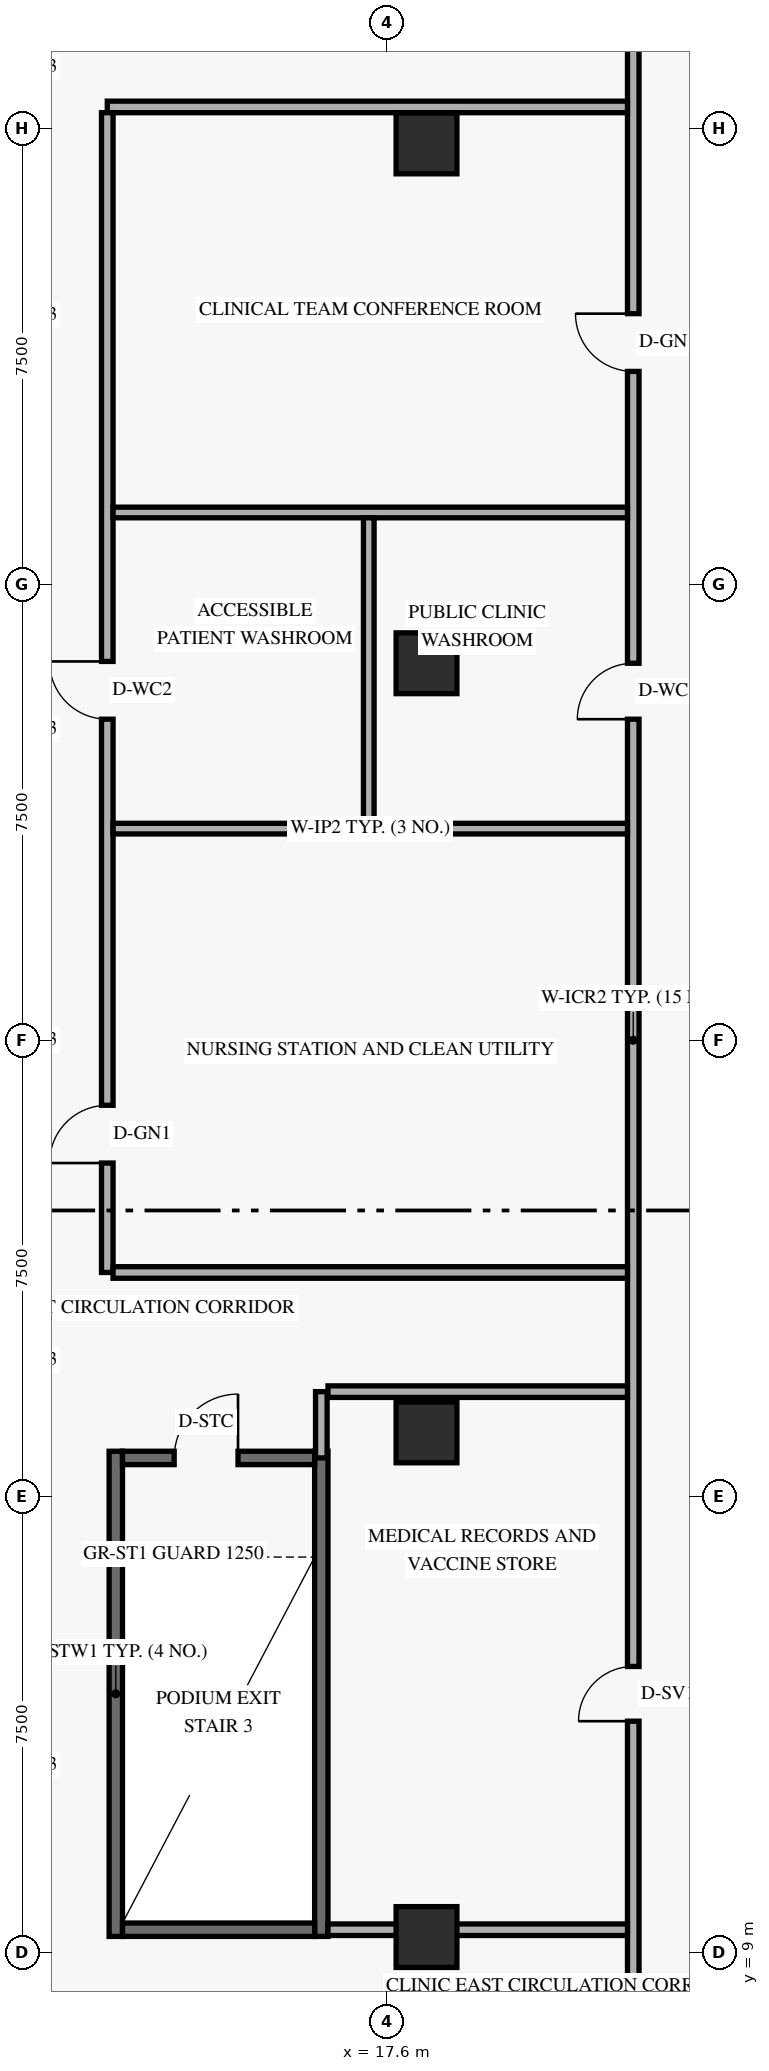
"""IFC4 building model, lengths in metres.
Left out: names, types, materials, properties, quantities, classifications, styles, units other than length and angle.
Written with IfcOpenShell. Run it as: python <this file> out.ifc"""

import sys

from ifc_helpers import new_model, si_unit, direction, frame, frame_2d, origin, origin_2d, place, context, subcontext, project, spatial, rectangle, extrude, element, fill, save


model = new_model("IFC4")
c1 = context("Model", 3, precision=1e-05, world=origin(), true_north=direction((0.0, 1.0)))
c2 = subcontext(c1, "Body", "Model", "MODEL_VIEW")
j1 = project(units=[si_unit("LENGTHUNIT", "METRE"), si_unit("PLANEANGLEUNIT", "RADIAN")], contexts=[c1])
p1 = place(None, origin())
s1 = spatial("IfcSite", under=j1, at=p1, CompositionType="ELEMENT")
p2 = place(p1, origin())
s2 = spatial("IfcBuilding", under=s1, at=p2, CompositionType="ELEMENT")
p3 = place(p2, frame((0.0, 0.0, 19.2)))
s3 = spatial("IfcBuildingStorey", under=s2, at=p3, CompositionType="ELEMENT", Elevation=19.2)
for number, where, z_axis, x_axis in (
    (1, (13.14, 9.26, 0.0), (0.0, 0.0, 1.0), (0.0, 1.0, 0.0)),
    (2, (16.52, 9.26, 0.0), (0.0, 0.0, 1.0), (0.0, 1.0, 0.0)),
):
    element("IfcWall", number, at=place(p3, frame(where, z_axis=z_axis, x_axis=x_axis)), inside=s3, PredefinedType="SHEAR", context=c2, shape_type="SweptSolid", body=[
        extrude(rectangle(XDim=7.98, YDim=0.22, at=frame_2d((3.99, 0.0))), origin(), (0.0, 0.0, 1.0), 4.5),
    ])
p4 = place(p3, frame((13.25, 9.37, 0.0), z_axis=(0.0, 0.0, 1.0), x_axis=(1.0, 0.0, 0.0)))
e3 = element("IfcWall", 3, at=p4, inside=s3, PredefinedType="SHEAR", context=c2, shape_type="SweptSolid", body=[
    extrude(rectangle(XDim=3.16, YDim=0.22, at=frame_2d((1.58, 0.0))), origin(), (0.0, 0.0, 1.0), 4.5),
])
p5 = place(p3, frame((13.25, 17.13, 0.0), z_axis=(0.0, 0.0, 1.0), x_axis=(1.0, 0.0, 0.0)))
e4 = element("IfcWall", 4, at=p5, inside=s3, PredefinedType="SHEAR", context=c2, shape_type="SweptSolid", body=[
    extrude(rectangle(XDim=3.16, YDim=0.22, at=frame_2d((1.58, 0.0))), origin(), (0.0, 0.0, 1.0), 4.5),
])
p6 = place(p5, frame((0.85, 0.0, 0.0)))
e5 = element("IfcOpeningElement", 5, at=p6, cuts=e4, PredefinedType="OPENING", context=c2, shape_type="SweptSolid", body=[
    extrude(rectangle(XDim=1.05, YDim=2.15, at=frame_2d((0.525, 1.075))), frame((0.0, 0.12, 0.0), z_axis=(0.0, -1.0, 0.0), x_axis=(1.0, 0.0, 0.0)), (0.0, 0.0, 1.0), 0.24),
])
for number, where, z_axis, x_axis in (
    (6, (18.25, 9.25, 0.0), (0.0, 0.0, 1.0), (1.0, 0.0, 0.0)),
    (7, (18.25, 17.55, 0.0), (0.0, 0.0, 1.0), (1.0, 0.0, 0.0)),
    (8, (18.25, 30.2, 0.0), (0.0, 0.0, 1.0), (1.0, 0.0, 0.0)),
    (9, (18.25, 38.75, 0.0), (0.0, 0.0, 1.0), (1.0, 0.0, 0.0)),
):
    element("IfcColumn", number, at=place(p3, frame(where, z_axis=z_axis, x_axis=x_axis)), inside=s3, PredefinedType="COLUMN", context=c2, shape_type="SweptSolid", body=[
        extrude(rectangle(XDim=1.0, YDim=1.0, at=origin_2d()), origin(), (0.0, 0.0, 1.0), 4.8),
    ])
p7 = place(p3, frame((21.65, 6.8, 0.0), z_axis=(0.0, 0.0, 1.0), x_axis=(0.0, 1.0, 0.0)))
e10 = element("IfcWall", 10, at=p7, inside=s3, PredefinedType="STANDARD", context=c2, shape_type="SweptSolid", body=[
    extrude(rectangle(XDim=34.4, YDim=0.19, at=frame_2d((17.2, 0.0))), origin(), (0.0, 0.0, 1.0), 3.555),
])
p8 = place(p7, frame((22.48, 0.0, 0.0)))
e11 = element("IfcOpeningElement", 11, at=p8, cuts=e10, PredefinedType="OPENING", context=c2, shape_type="SweptSolid", body=[
    extrude(rectangle(XDim=0.92, YDim=2.14, at=frame_2d((0.46, 1.07))), frame((0.0, 0.105, 0.0), z_axis=(0.0, -1.0, 0.0), x_axis=(1.0, 0.0, 0.0)), (0.0, 0.0, 1.0), 0.21),
])
p9 = place(p7, frame((28.2, 0.0, 0.0)))
e12 = element("IfcOpeningElement", 12, at=p9, cuts=e10, PredefinedType="OPENING", context=c2, shape_type="SweptSolid", body=[
    extrude(rectangle(XDim=0.95, YDim=2.15, at=frame_2d((0.475, 1.075))), frame((0.0, 0.105, 0.0), z_axis=(0.0, -1.0, 0.0), x_axis=(1.0, 0.0, 0.0)), (0.0, 0.0, 1.0), 0.21),
])
p10 = place(p7, frame((6.0, 0.0, 0.0)))
e13 = element("IfcOpeningElement", 13, at=p10, cuts=e10, PredefinedType="OPENING", context=c2, shape_type="SweptSolid", body=[
    extrude(rectangle(XDim=0.9, YDim=2.1, at=frame_2d((0.45, 1.05))), frame((0.0, 0.105, 0.0), z_axis=(0.0, -1.0, 0.0), x_axis=(1.0, 0.0, 0.0)), (0.0, 0.0, 1.0), 0.21),
])
p11 = place(p3, frame((16.63, 9.37, 0.0), z_axis=(0.0, 0.0, 1.0), x_axis=(1.0, 0.0, 0.0)))
e14 = element("IfcWall", 14, at=p11, inside=s3, PredefinedType="STANDARD", context=c2, shape_type="SweptSolid", body=[
    extrude(rectangle(XDim=4.925, YDim=0.19, at=frame_2d((2.462, 0.0))), origin(), (0.0, 0.0, 1.0), 3.555),
])
p12 = place(p3, frame((13.0, 39.35, 0.0), z_axis=(0.0, 0.0, 1.0), x_axis=(1.0, 0.0, 0.0)))
e15 = element("IfcWall", 15, at=p12, inside=s3, PredefinedType="STANDARD", context=c2, shape_type="SweptSolid", body=[
    extrude(rectangle(XDim=8.555, YDim=0.19, at=frame_2d((4.277, 0.0))), origin(), (0.0, 0.0, 1.0), 3.712),
])
p13 = place(p3, frame((13.0, 20.18, 0.0), z_axis=(0.0, 0.0, 1.0), x_axis=(0.0, 1.0, 0.0)))
e16 = element("IfcWall", 16, at=p13, inside=s3, PredefinedType="STANDARD", context=c2, shape_type="SweptSolid", body=[
    extrude(rectangle(XDim=19.075, YDim=0.19, at=frame_2d((9.538, 0.0))), origin(), (0.0, 0.0, 1.0), 3.555),
])
p14 = place(p13, frame((1.8, 0.0, 0.0)))
e17 = element("IfcOpeningElement", 17, at=p14, cuts=e16, PredefinedType="OPENING", context=c2, shape_type="SweptSolid", body=[
    extrude(rectangle(XDim=0.95, YDim=2.15, at=frame_2d((0.475, 1.075))), frame((0.0, 0.105, 0.0), z_axis=(0.0, -1.0, 0.0), x_axis=(1.0, 0.0, 0.0)), (0.0, 0.0, 1.0), 0.21),
])
p15 = place(p13, frame((9.1, 0.0, 0.0)))
e18 = element("IfcOpeningElement", 18, at=p15, cuts=e16, PredefinedType="OPENING", context=c2, shape_type="SweptSolid", body=[
    extrude(rectangle(XDim=0.95, YDim=2.14, at=frame_2d((0.475, 1.07))), frame((0.0, 0.105, 0.0), z_axis=(0.0, -1.0, 0.0), x_axis=(1.0, 0.0, 0.0)), (0.0, 0.0, 1.0), 0.21),
])
p16 = place(p3, frame((16.63, 18.22, 0.0), z_axis=(0.0, 0.0, 1.0), x_axis=(1.0, 0.0, 0.0)))
e19 = element("IfcWall", 19, at=p16, inside=s3, PredefinedType="STANDARD", context=c2, shape_type="SweptSolid", body=[
    extrude(rectangle(XDim=4.925, YDim=0.19, at=frame_2d((2.462, 0.0))), origin(), (0.0, 0.0, 1.0), 3.712),
])
p17 = place(p3, frame((16.52, 17.13, 0.0), z_axis=(0.0, 0.0, 1.0), x_axis=(0.0, 1.0, 0.0)))
e20 = element("IfcWall", 20, at=p17, inside=s3, PredefinedType="STANDARD", context=c2, shape_type="SweptSolid", body=[
    extrude(rectangle(XDim=1.09, YDim=0.19, at=frame_2d((0.545, 0.0))), origin(), (0.0, 0.0, 1.0), 3.555),
])
p18 = place(p3, frame((13.095, 20.18, 0.0), z_axis=(0.0, 0.0, 1.0), x_axis=(1.0, 0.0, 0.0)))
e21 = element("IfcWall", 21, at=p18, inside=s3, PredefinedType="STANDARD", context=c2, shape_type="SweptSolid", body=[
    extrude(rectangle(XDim=8.46, YDim=0.19, at=frame_2d((4.23, 0.0))), origin(), (0.0, 0.0, 1.0), 3.712),
])
for number, where, z_axis, x_axis in (
    (22, (13.095, 27.48, 0.0), (0.0, 0.0, 1.0), (1.0, 0.0, 0.0)),
    (23, (13.095, 32.68, 0.0), (0.0, 0.0, 1.0), (1.0, 0.0, 0.0)),
):
    element("IfcWall", number, at=place(p3, frame(where, z_axis=z_axis, x_axis=x_axis)), inside=s3, PredefinedType="PLUMBINGWALL", context=c2, shape_type="SweptSolid", body=[
        extrude(rectangle(XDim=8.46, YDim=0.175, at=frame_2d((4.23, 0.0))), origin(), (0.0, 0.0, 1.0), 3.712),
    ])
p19 = place(p3, frame((17.3, 27.567, 0.0), z_axis=(0.0, 0.0, 1.0), x_axis=(0.0, 1.0, 0.0)))
e24 = element("IfcWall", 24, at=p19, inside=s3, PredefinedType="PLUMBINGWALL", context=c2, shape_type="SweptSolid", body=[
    extrude(rectangle(XDim=5.025, YDim=0.175, at=frame_2d((2.513, 0.0))), origin(), (0.0, 0.0, 1.0), 3.555),
])
p20 = place(p6, frame((1.05, 0.0, 0.0), z_axis=(0.0, 0.0, 1.0), x_axis=(-1.0, 0.0, 0.0)))
e25 = element("IfcDoor", 25, at=p20, inside=s3, OperationType="SINGLE_SWING_LEFT", PredefinedType="DOOR", context=c2, shape_type="SweptSolid", body=[
    extrude(rectangle(XDim=1.05, YDim=2.15, at=frame_2d((0.525, 1.075))), frame((0.0, 0.025, 0.0), z_axis=(0.0, -1.0, 0.0), x_axis=(1.0, 0.0, 0.0)), (0.0, 0.0, 1.0), 0.05),
])
fill(e5, e25)
p21 = place(p14, origin())
e26 = element("IfcDoor", 26, at=p21, inside=s3, OperationType="SINGLE_SWING_LEFT", PredefinedType="DOOR", context=c2, shape_type="SweptSolid", body=[
    extrude(rectangle(XDim=0.95, YDim=2.15, at=frame_2d((0.475, 1.075))), frame((0.0, 0.025, 0.0), z_axis=(0.0, -1.0, 0.0), x_axis=(1.0, 0.0, 0.0)), (0.0, 0.0, 1.0), 0.05),
])
fill(e17, e26)
p22 = place(p15, origin())
e27 = element("IfcDoor", 27, at=p22, inside=s3, OperationType="SINGLE_SWING_RIGHT", PredefinedType="DOOR", context=c2, shape_type="SweptSolid", body=[
    extrude(rectangle(XDim=0.95, YDim=2.14, at=frame_2d((0.475, 1.07))), frame((0.0, 0.025, 0.0), z_axis=(0.0, -1.0, 0.0), x_axis=(1.0, 0.0, 0.0)), (0.0, 0.0, 1.0), 0.05),
])
fill(e18, e27)
p23 = place(p8, origin())
e28 = element("IfcDoor", 28, at=p23, inside=s3, OperationType="SINGLE_SWING_LEFT", PredefinedType="DOOR", context=c2, shape_type="SweptSolid", body=[
    extrude(rectangle(XDim=0.92, YDim=2.14, at=frame_2d((0.46, 1.07))), frame((0.0, 0.025, 0.0), z_axis=(0.0, -1.0, 0.0), x_axis=(1.0, 0.0, 0.0)), (0.0, 0.0, 1.0), 0.05),
])
fill(e11, e28)
p24 = place(p9, origin())
e29 = element("IfcDoor", 29, at=p24, inside=s3, OperationType="SINGLE_SWING_RIGHT", PredefinedType="DOOR", context=c2, shape_type="SweptSolid", body=[
    extrude(rectangle(XDim=0.95, YDim=2.15, at=frame_2d((0.475, 1.075))), frame((0.0, 0.025, 0.0), z_axis=(0.0, -1.0, 0.0), x_axis=(1.0, 0.0, 0.0)), (0.0, 0.0, 1.0), 0.05),
])
fill(e12, e29)
p25 = place(p10, origin())
e30 = element("IfcDoor", 30, at=p25, inside=s3, OperationType="SINGLE_SWING_LEFT", PredefinedType="DOOR", context=c2, shape_type="SweptSolid", body=[
    extrude(rectangle(XDim=0.9, YDim=2.1, at=frame_2d((0.45, 1.05))), frame((0.0, 0.025, 0.0), z_axis=(0.0, -1.0, 0.0), x_axis=(1.0, 0.0, 0.0)), (0.0, 0.0, 1.0), 0.05),
])
fill(e13, e30)
save(model, sys.argv[1])
